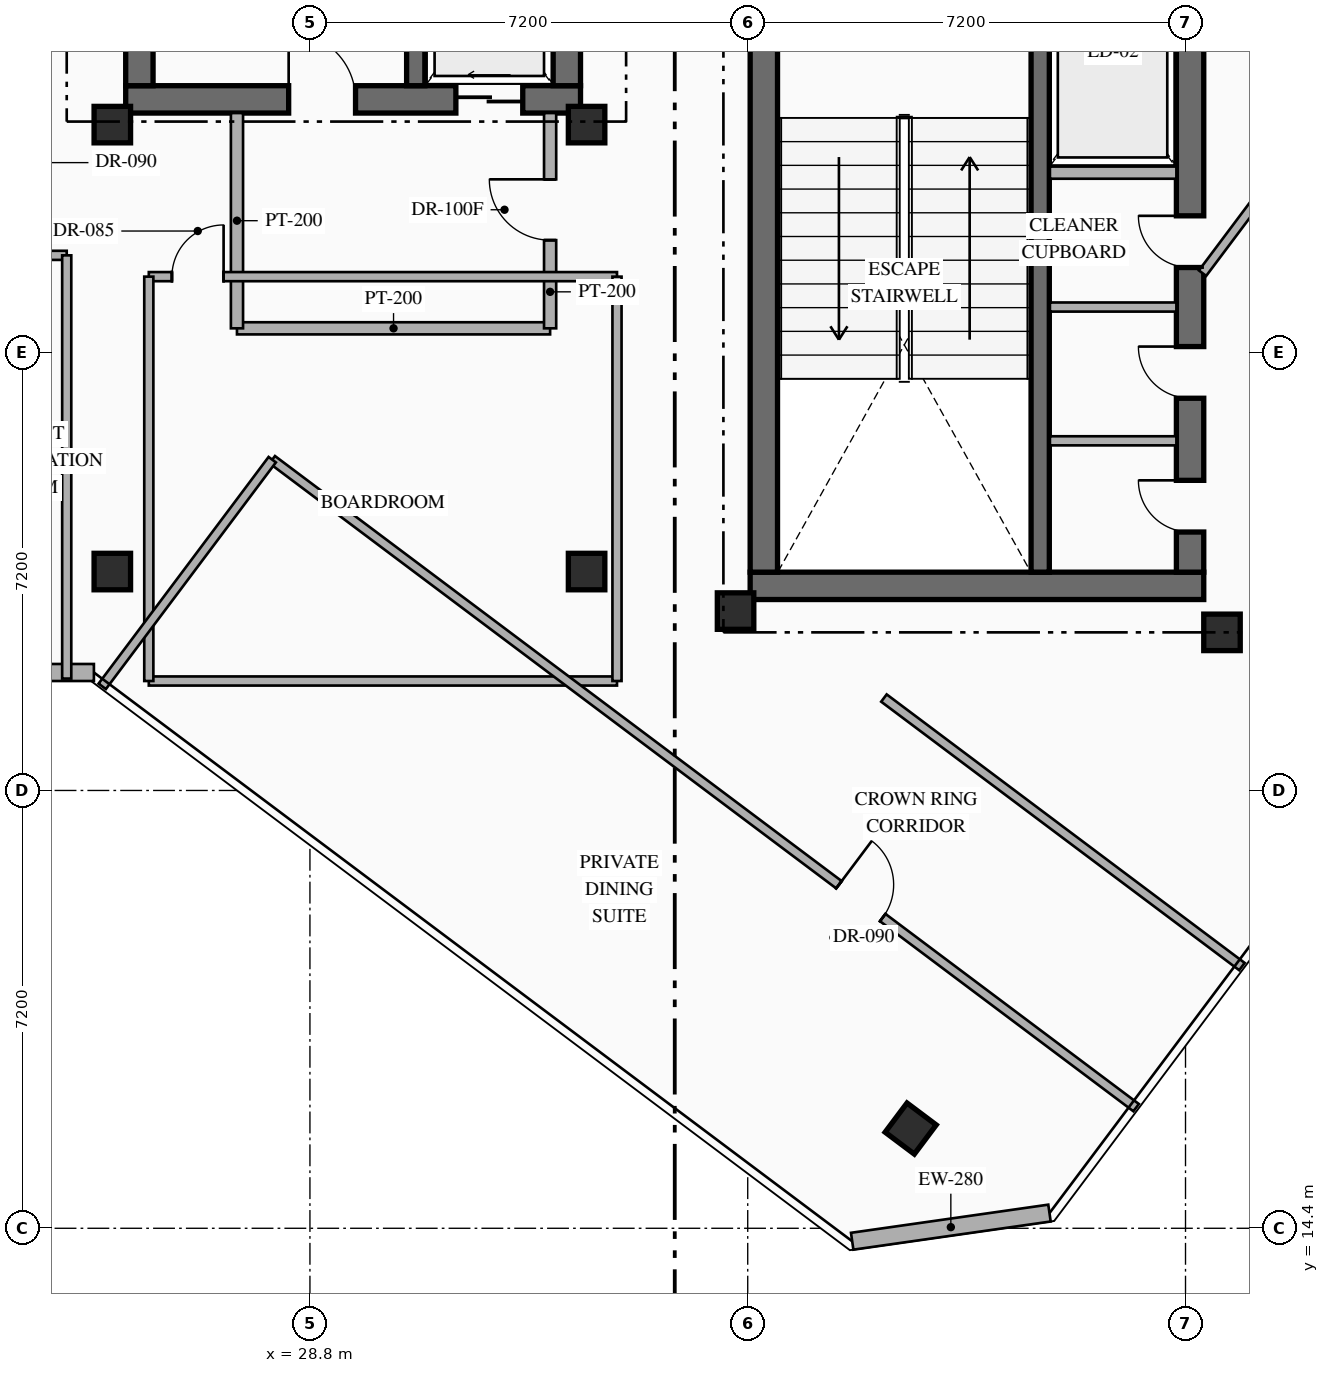
"""IFC4 building model, lengths in metres.
Left out: names, types, materials, properties, quantities, classifications, styles, units other than length and angle.
Written with IfcOpenShell. Run it as: python <this file> out.ifc"""

import sys

from ifc_helpers import new_model, si_unit, direction, frame, frame_2d, origin, origin_2d, place, context, subcontext, project, spatial, rectangle, hollow_rectangle, extrude, element, fill, save


model = new_model("IFC4")
c1 = context("Model", 3, precision=1e-05, world=origin(), true_north=direction((0.0, 1.0)))
c2 = subcontext(c1, "Body", "Model", "MODEL_VIEW")
j1 = project(units=[si_unit("LENGTHUNIT", "METRE"), si_unit("PLANEANGLEUNIT", "RADIAN")], contexts=[c1])
p1 = place(None, origin())
s1 = spatial("IfcSite", under=j1, at=p1, CompositionType="ELEMENT")
p2 = place(p1, origin())
s2 = spatial("IfcBuilding", under=s1, at=p2, CompositionType="ELEMENT")
p3 = place(p2, frame((0.0, 0.0, 273.95)))
s3 = spatial("IfcBuildingStorey", under=s2, at=p3, CompositionType="ELEMENT", Elevation=273.95)
p4 = place(p3, frame((25.77, 32.965, 0.0), z_axis=(0.0, 0.0, 1.0), x_axis=(1.0, 0.0, 0.0)))
e1 = element("IfcWall", 1, at=p4, inside=s3, PredefinedType="SHEAR", context=c2, shape_type="SweptSolid", body=[
    extrude(rectangle(XDim=7.48, YDim=0.45, at=frame_2d((3.74, 0.0))), origin(), (0.0, 0.0, 1.0), 4.0),
])
p5 = place(p4, frame((2.68, 0.0, 0.0)))
e2 = element("IfcOpeningElement", 2, at=p5, cuts=e1, PredefinedType="OPENING", context=c2, shape_type="SweptSolid", body=[
    extrude(rectangle(XDim=1.1, YDim=2.2, at=frame_2d((0.55, 1.1))), frame((0.0, 0.235, 0.0), z_axis=(0.0, -1.0, 0.0), x_axis=(1.0, 0.0, 0.0)), (0.0, 0.0, 1.0), 0.47),
])
p6 = place(p4, frame((5.43, 0.0, 0.0)))
e3 = element("IfcOpeningElement", 3, at=p6, cuts=e1, PredefinedType="OPENING", context=c2, shape_type="SweptSolid", body=[
    extrude(rectangle(XDim=1.1, YDim=2.15, at=frame_2d((0.55, 1.075))), frame((0.0, 0.235, 0.0), z_axis=(0.0, -1.0, 0.0), x_axis=(1.0, 0.0, 0.0)), (0.0, 0.0, 1.0), 0.47),
])
p7 = place(p3, frame((25.995, 33.19, 0.0), z_axis=(0.0, 0.0, 1.0), x_axis=(0.0, 1.0, 0.0)))
e4 = element("IfcWall", 4, at=p7, inside=s3, PredefinedType="SHEAR", context=c2, shape_type="SweptSolid", body=[
    extrude(rectangle(XDim=9.48, YDim=0.45, at=frame_2d((4.74, 0.0))), origin(), (0.0, 0.0, 1.0), 4.0),
])
p8 = place(p3, frame((33.025, 33.19, 0.0), z_axis=(0.0, 0.0, 1.0), x_axis=(0.0, 1.0, 0.0)))
e5 = element("IfcWall", 5, at=p8, inside=s3, PredefinedType="SHEAR", context=c2, shape_type="SweptSolid", body=[
    extrude(rectangle(XDim=9.48, YDim=0.45, at=frame_2d((4.74, 0.0))), origin(), (0.0, 0.0, 1.0), 4.0),
])
p9 = place(p8, frame((3.61, 0.0, 0.0)))
e6 = element("IfcOpeningElement", 6, at=p9, cuts=e5, PredefinedType="OPENING", context=c2, shape_type="SweptSolid", body=[
    extrude(rectangle(XDim=0.85, YDim=2.08, at=frame_2d((0.425, 1.04))), frame((0.0, 0.235, 0.0), z_axis=(0.0, -1.0, 0.0), x_axis=(1.0, 0.0, 0.0)), (0.0, 0.0, 1.0), 0.47),
])
p10 = place(p8, frame((5.76, 0.0, 0.0)))
e7 = element("IfcOpeningElement", 7, at=p10, cuts=e5, PredefinedType="OPENING", context=c2, shape_type="SweptSolid", body=[
    extrude(rectangle(XDim=0.85, YDim=2.08, at=frame_2d((0.425, 1.04))), frame((0.0, 0.235, 0.0), z_axis=(0.0, -1.0, 0.0), x_axis=(1.0, 0.0, 0.0)), (0.0, 0.0, 1.0), 0.47),
])
p11 = place(p8, frame((7.76, 0.0, 0.0)))
e8 = element("IfcOpeningElement", 8, at=p11, cuts=e5, PredefinedType="OPENING", context=c2, shape_type="SweptSolid", body=[
    extrude(rectangle(XDim=0.85, YDim=2.08, at=frame_2d((0.425, 1.04))), frame((0.0, 0.235, 0.0), z_axis=(0.0, -1.0, 0.0), x_axis=(1.0, 0.0, 0.0)), (0.0, 0.0, 1.0), 0.47),
])
p12 = place(p3, frame((30.54, 33.19, 0.0), z_axis=(0.0, 0.0, 1.0), x_axis=(0.0, 1.0, 0.0)))
e9 = element("IfcWall", 9, at=p12, inside=s3, PredefinedType="SHEAR", context=c2, shape_type="SweptSolid", body=[
    extrude(rectangle(XDim=9.48, YDim=0.3, at=frame_2d((4.74, 0.0))), origin(), (0.0, 0.0, 1.0), 4.0),
])
p13 = place(p3, frame((36.04, 24.965, 0.0), z_axis=(0.0, 0.0, 1.0), x_axis=(1.0, 0.0, 0.0)))
e10 = element("IfcWall", 10, at=p13, inside=s3, PredefinedType="SHEAR", context=c2, shape_type="SweptSolid", body=[
    extrude(rectangle(XDim=7.46, YDim=0.45, at=frame_2d((3.73, 0.0))), origin(), (0.0, 0.0, 1.0), 4.0),
])
p14 = place(p3, frame((36.265, 25.19, 0.0), z_axis=(0.0, 0.0, 1.0), x_axis=(0.0, 1.0, 0.0)))
e11 = element("IfcWall", 11, at=p14, inside=s3, PredefinedType="SHEAR", context=c2, shape_type="SweptSolid", body=[
    extrude(rectangle(XDim=9.48, YDim=0.45, at=frame_2d((4.74, 0.0))), origin(), (0.0, 0.0, 1.0), 4.0),
])
p15 = place(p3, frame((43.275, 25.19, 0.0), z_axis=(0.0, 0.0, 1.0), x_axis=(0.0, 1.0, 0.0)))
e12 = element("IfcWall", 12, at=p15, inside=s3, PredefinedType="SHEAR", context=c2, shape_type="SweptSolid", body=[
    extrude(rectangle(XDim=9.48, YDim=0.45, at=frame_2d((4.74, 0.0))), origin(), (0.0, 0.0, 1.0), 4.0),
])
p16 = place(p15, frame((0.66, 0.0, 0.0)))
e13 = element("IfcOpeningElement", 13, at=p16, cuts=e12, PredefinedType="OPENING", context=c2, shape_type="SweptSolid", body=[
    extrude(rectangle(XDim=0.85, YDim=2.08, at=frame_2d((0.425, 1.04))), frame((0.0, 0.235, 0.0), z_axis=(0.0, -1.0, 0.0), x_axis=(1.0, 0.0, 0.0)), (0.0, 0.0, 1.0), 0.47),
])
p17 = place(p15, frame((2.86, 0.0, 0.0)))
e14 = element("IfcOpeningElement", 14, at=p17, cuts=e12, PredefinedType="OPENING", context=c2, shape_type="SweptSolid", body=[
    extrude(rectangle(XDim=0.85, YDim=2.08, at=frame_2d((0.425, 1.04))), frame((0.0, 0.235, 0.0), z_axis=(0.0, -1.0, 0.0), x_axis=(1.0, 0.0, 0.0)), (0.0, 0.0, 1.0), 0.47),
])
p18 = place(p15, frame((5.01, 0.0, 0.0)))
e15 = element("IfcOpeningElement", 15, at=p18, cuts=e12, PredefinedType="OPENING", context=c2, shape_type="SweptSolid", body=[
    extrude(rectangle(XDim=0.85, YDim=2.08, at=frame_2d((0.425, 1.04))), frame((0.0, 0.235, 0.0), z_axis=(0.0, -1.0, 0.0), x_axis=(1.0, 0.0, 0.0)), (0.0, 0.0, 1.0), 0.47),
])
p19 = place(p3, frame((40.81, 25.19, 0.0), z_axis=(0.0, 0.0, 1.0), x_axis=(0.0, 1.0, 0.0)))
e16 = element("IfcWall", 16, at=p19, inside=s3, PredefinedType="SHEAR", context=c2, shape_type="SweptSolid", body=[
    extrude(rectangle(XDim=9.48, YDim=0.3, at=frame_2d((4.74, 0.0))), origin(), (0.0, 0.0, 1.0), 4.0),
])
for number, where, z_axis, x_axis in (
    (17, (25.55, 32.55, 0.0), (0.0, 0.0, 1.0), (1.0, 0.0, 0.0)),
    (18, (33.35, 32.55, 0.0), (0.0, 0.0, 1.0), (1.0, 0.0, 0.0)),
    (19, (35.8, 24.55, 0.0), (0.0, 0.0, 1.0), (1.0, 0.0, 0.0)),
    (20, (43.8, 24.2, 0.0), (0.0, 0.0, 1.0), (1.0, 0.0, 0.0)),
    (21, (25.55, 25.2, 0.0), (0.0, 0.0, 1.0), (1.0, 0.0, 0.0)),
    (22, (33.35, 25.2, 0.0), (0.0, 0.0, 1.0), (1.0, 0.0, 0.0)),
    (23, (38.68, 16.04, 0.0), (0.0, 0.0, 1.0), (0.8, -0.6, 0.0)),
):
    element("IfcColumn", number, at=place(p3, frame(where, z_axis=z_axis, x_axis=x_axis)), inside=s3, PredefinedType="COLUMN", context=c2, shape_type="SweptSolid", body=[
        extrude(hollow_rectangle(XDim=0.6, YDim=0.6, WallThickness=0.025, at=origin_2d()), origin(), (0.0, 0.0, 1.0), 4.0),
    ])
p20 = place(p3, frame((40.963, 14.65, 0.0), z_axis=(0.0, 0.0, 1.0), x_axis=(-0.989977778067, -0.141223223777, 0.0)))
e24 = element("IfcWall", 24, at=p20, inside=s3, PredefinedType="STANDARD", context=c2, shape_type="SweptSolid", body=[
    extrude(rectangle(XDim=3.278, YDim=0.28, at=frame_2d((1.639, 0.0))), origin(), (0.0, 0.0, 1.0), 3.75),
])
p21 = place(p3, frame((25.247, 23.54, 0.0), z_axis=(0.0, 0.0, 1.0), x_axis=(-1.0, 0.0, 0.0)))
e25 = element("IfcWall", 25, at=p21, inside=s3, PredefinedType="STANDARD", context=c2, shape_type="SweptSolid", body=[
    extrude(rectangle(XDim=4.707, YDim=0.28, at=frame_2d((2.354, 0.0))), origin(), (0.0, 0.0, 1.0), 3.75),
])
p22 = place(p3, frame((40.97, 31.76, 0.0), z_axis=(0.0, 0.0, 1.0), x_axis=(1.0, 0.0, 0.0)))
e26 = element("IfcWall", 26, at=p22, inside=s3, PredefinedType="STANDARD", context=c2, shape_type="SweptSolid", body=[
    extrude(rectangle(XDim=2.08, YDim=0.2, at=frame_2d((1.04, 0.0))), origin(), (0.0, 0.0, 1.0), 3.75),
])
for number, where, z_axis, x_axis in (
    (27, (40.97, 27.35, 0.0), (0.0, 0.0, 1.0), (1.0, 0.0, 0.0)),
    (28, (40.97, 29.55, 0.0), (0.0, 0.0, 1.0), (1.0, 0.0, 0.0)),
):
    element("IfcWall", number, at=place(p3, frame(where, z_axis=z_axis, x_axis=x_axis)), inside=s3, PredefinedType="PARTITIONING", context=c2, shape_type="SweptSolid", body=[
        extrude(rectangle(XDim=2.08, YDim=0.15, at=frame_2d((1.04, 0.0))), origin(), (0.0, 0.0, 1.0), 3.75),
    ])
p23 = place(p3, frame((27.6, 29.2, 0.0), z_axis=(0.0, 0.0, 1.0), x_axis=(1.0, 0.0, 0.0)))
e29 = element("IfcWall", 29, at=p23, inside=s3, PredefinedType="STANDARD", context=c2, shape_type="SweptSolid", body=[
    extrude(rectangle(XDim=5.15, YDim=0.2, at=frame_2d((2.575, 0.0))), origin(), (0.0, 0.0, 1.0), 3.75),
])
p24 = place(p3, frame((27.6, 29.2, 0.0), z_axis=(0.0, 0.0, 1.0), x_axis=(0.0, 1.0, 0.0)))
e30 = element("IfcWall", 30, at=p24, inside=s3, PredefinedType="STANDARD", context=c2, shape_type="SweptSolid", body=[
    extrude(rectangle(XDim=3.54, YDim=0.2, at=frame_2d((1.77, 0.0))), origin(), (0.0, 0.0, 1.0), 3.75),
])
p25 = place(p3, frame((32.75, 29.2, 0.0), z_axis=(0.0, 0.0, 1.0), x_axis=(0.0, 1.0, 0.0)))
e31 = element("IfcWall", 31, at=p25, inside=s3, PredefinedType="STANDARD", context=c2, shape_type="SweptSolid", body=[
    extrude(rectangle(XDim=3.54, YDim=0.2, at=frame_2d((1.77, 0.0))), origin(), (0.0, 0.0, 1.0), 3.75),
])
p26 = place(p25, frame((1.45, 0.0, 0.0)))
e32 = element("IfcOpeningElement", 32, at=p26, cuts=e31, PredefinedType="OPENING", context=c2, shape_type="SweptSolid", body=[
    extrude(rectangle(XDim=1.0, YDim=2.2, at=frame_2d((0.5, 1.1))), frame((0.0, 0.11, 0.0), z_axis=(0.0, -1.0, 0.0), x_axis=(1.0, 0.0, 0.0)), (0.0, 0.0, 1.0), 0.22),
])
p27 = place(p3, frame((26.15, 23.4, 0.0), z_axis=(0.0, 0.0, 1.0), x_axis=(1.0, 0.0, 0.0)))
e33 = element("IfcWall", 33, at=p27, inside=s3, PredefinedType="PARTITIONING", context=c2, shape_type="SweptSolid", body=[
    extrude(rectangle(XDim=7.7, YDim=0.15, at=frame_2d((3.85, 0.0))), origin(), (0.0, 0.0, 1.0), 3.75),
])
p28 = place(p3, frame((26.15, 30.05, 0.0), z_axis=(0.0, 0.0, 1.0), x_axis=(1.0, 0.0, 0.0)))
e34 = element("IfcWall", 34, at=p28, inside=s3, PredefinedType="PARTITIONING", context=c2, shape_type="SweptSolid", body=[
    extrude(rectangle(XDim=7.7, YDim=0.15, at=frame_2d((3.85, 0.0))), origin(), (0.0, 0.0, 1.0), 3.75),
])
p29 = place(p28, frame((0.38, 0.0, 0.0)))
e35 = element("IfcOpeningElement", 35, at=p29, cuts=e34, PredefinedType="OPENING", context=c2, shape_type="SweptSolid", body=[
    extrude(rectangle(XDim=0.85, YDim=2.08, at=frame_2d((0.425, 1.04))), frame((0.0, 0.085, 0.0), z_axis=(0.0, -1.0, 0.0), x_axis=(1.0, 0.0, 0.0)), (0.0, 0.0, 1.0), 0.17),
])
for number, where, z_axis, x_axis in (
    (36, (26.15, 23.4, 0.0), (0.0, 0.0, 1.0), (0.0, 1.0, 0.0)),
    (37, (33.85, 23.4, 0.0), (0.0, 0.0, 1.0), (0.0, 1.0, 0.0)),
):
    element("IfcWall", number, at=place(p3, frame(where, z_axis=z_axis, x_axis=x_axis)), inside=s3, PredefinedType="PARTITIONING", context=c2, shape_type="SweptSolid", body=[
        extrude(rectangle(XDim=6.65, YDim=0.15, at=frame_2d((3.325, 0.0))), origin(), (0.0, 0.0, 1.0), 3.75),
    ])
p30 = place(p3, frame((28.18, 27.04, 0.0), z_axis=(0.0, 0.0, 1.0), x_axis=(0.8, -0.6, 0.0)))
e38 = element("IfcWall", 38, at=p30, inside=s3, PredefinedType="PARTITIONING", context=c2, shape_type="SweptSolid", body=[
    extrude(rectangle(XDim=17.76, YDim=0.15, at=frame_2d((8.88, 0.0))), origin(), (0.0, 0.0, 1.0), 3.75),
])
p31 = place(p30, frame((11.65, 0.0, 0.0)))
e39 = element("IfcOpeningElement", 39, at=p31, cuts=e38, PredefinedType="OPENING", context=c2, shape_type="SweptSolid", body=[
    extrude(rectangle(XDim=0.9, YDim=2.15, at=frame_2d((0.45, 1.075))), frame((0.0, 0.085, 0.0), z_axis=(0.0, -1.0, 0.0), x_axis=(1.0, 0.0, 0.0)), (0.0, 0.0, 1.0), 0.17),
])
p32 = place(p3, frame((25.384, 23.312, 0.0), z_axis=(0.0, 0.0, 1.0), x_axis=(0.599983234706, 0.800012573696, 0.0)))
e40 = element("IfcWall", 40, at=p32, inside=s3, PredefinedType="PARTITIONING", context=c2, shape_type="SweptSolid", body=[
    extrude(rectangle(XDim=4.66, YDim=0.15, at=frame_2d((2.33, 0.0))), origin(), (0.0, 0.0, 1.0), 3.75),
])
p33 = place(p3, frame((22.85, 30.4, 0.0), z_axis=(0.0, 0.0, 1.0), x_axis=(1.0, 0.0, 0.0)))
e41 = element("IfcWall", 41, at=p33, inside=s3, PredefinedType="PARTITIONING", context=c2, shape_type="SweptSolid", body=[
    extrude(rectangle(XDim=1.95, YDim=0.15, at=frame_2d((0.975, 0.0))), origin(), (0.0, 0.0, 1.0), 3.75),
])
p34 = place(p33, frame((0.703, 0.0, 0.0)))
e42 = element("IfcOpeningElement", 42, at=p34, cuts=e41, PredefinedType="OPENING", context=c2, shape_type="SweptSolid", body=[
    extrude(rectangle(XDim=0.85, YDim=2.08, at=frame_2d((0.425, 1.04))), frame((0.0, 0.085, 0.0), z_axis=(0.0, -1.0, 0.0), x_axis=(1.0, 0.0, 0.0)), (0.0, 0.0, 1.0), 0.17),
])
p35 = place(p3, frame((24.8, 23.44, 0.0), z_axis=(0.0, 0.0, 1.0), x_axis=(0.0, 1.0, 0.0)))
e43 = element("IfcWall", 43, at=p35, inside=s3, PredefinedType="PARTITIONING", context=c2, shape_type="SweptSolid", body=[
    extrude(rectangle(XDim=6.96, YDim=0.15, at=frame_2d((3.48, 0.0))), origin(), (0.0, 0.0, 1.0), 3.75),
])
p36 = place(p3, frame((38.24, 23.12, 0.0), z_axis=(0.0, 0.0, 1.0), x_axis=(0.799996019408, -0.60000530742, 0.0)))
e44 = element("IfcWall", 44, at=p36, inside=s3, PredefinedType="PARTITIONING", context=c2, shape_type="SweptSolid", body=[
    extrude(rectangle(XDim=7.36, YDim=0.15, at=frame_2d((3.68, 0.0))), origin(), (0.0, 0.0, 1.0), 3.75),
])
p37 = place(p3, frame((43.48, 30.107, 0.0), z_axis=(0.0, 0.0, 1.0), x_axis=(0.600015730265, 0.799988202059, 0.0)))
e45 = element("IfcWall", 45, at=p37, inside=s3, PredefinedType="PARTITIONING", context=c2, shape_type="SweptSolid", body=[
    extrude(rectangle(XDim=4.967, YDim=0.15, at=frame_2d((2.483, 0.0))), origin(), (0.0, 0.0, 1.0), 3.75),
])
p38 = place(p37, frame((2.199, 0.0, 0.0)))
e46 = element("IfcOpeningElement", 46, at=p38, cuts=e45, PredefinedType="OPENING", context=c2, shape_type="SweptSolid", body=[
    extrude(rectangle(XDim=0.9, YDim=2.15, at=frame_2d((0.45, 1.075))), frame((0.0, 0.085, 0.0), z_axis=(0.0, -1.0, 0.0), x_axis=(1.0, 0.0, 0.0)), (0.0, 0.0, 1.0), 0.17),
])
p39 = place(p5, origin())
e47 = element("IfcDoor", 47, at=p39, inside=s3, OperationType="SINGLE_SWING_LEFT", PredefinedType="DOOR", context=c2, shape_type="SweptSolid", body=[
    extrude(rectangle(XDim=1.1, YDim=2.2, at=frame_2d((0.55, 1.1))), frame((0.0, 0.025, 0.0), z_axis=(0.0, -1.0, 0.0), x_axis=(1.0, 0.0, 0.0)), (0.0, 0.0, 1.0), 0.05),
])
fill(e2, e47)
p40 = place(p6, origin())
e48 = element("IfcDoor", 48, at=p40, inside=s3, OperationType="SLIDING_TO_LEFT", PredefinedType="USERDEFINED", context=c2, shape_type="SweptSolid", body=[
    extrude(rectangle(XDim=1.1, YDim=2.15, at=frame_2d((0.55, 1.075))), frame((0.0, 0.025, 0.0), z_axis=(0.0, -1.0, 0.0), x_axis=(1.0, 0.0, 0.0)), (0.0, 0.0, 1.0), 0.05),
])
fill(e3, e48)
p41 = place(p16, origin())
e49 = element("IfcDoor", 49, at=p41, inside=s3, OperationType="SINGLE_SWING_RIGHT", PredefinedType="DOOR", context=c2, shape_type="SweptSolid", body=[
    extrude(rectangle(XDim=0.85, YDim=2.08, at=frame_2d((0.425, 1.04))), frame((0.0, 0.025, 0.0), z_axis=(0.0, -1.0, 0.0), x_axis=(1.0, 0.0, 0.0)), (0.0, 0.0, 1.0), 0.05),
])
fill(e13, e49)
p42 = place(p17, origin())
e50 = element("IfcDoor", 50, at=p42, inside=s3, OperationType="SINGLE_SWING_RIGHT", PredefinedType="DOOR", context=c2, shape_type="SweptSolid", body=[
    extrude(rectangle(XDim=0.85, YDim=2.08, at=frame_2d((0.425, 1.04))), frame((0.0, 0.025, 0.0), z_axis=(0.0, -1.0, 0.0), x_axis=(1.0, 0.0, 0.0)), (0.0, 0.0, 1.0), 0.05),
])
fill(e14, e50)
p43 = place(p18, origin())
e51 = element("IfcDoor", 51, at=p43, inside=s3, OperationType="SINGLE_SWING_RIGHT", PredefinedType="DOOR", context=c2, shape_type="SweptSolid", body=[
    extrude(rectangle(XDim=0.85, YDim=2.08, at=frame_2d((0.425, 1.04))), frame((0.0, 0.025, 0.0), z_axis=(0.0, -1.0, 0.0), x_axis=(1.0, 0.0, 0.0)), (0.0, 0.0, 1.0), 0.05),
])
fill(e15, e51)
p44 = place(p26, origin())
e52 = element("IfcDoor", 52, at=p44, inside=s3, OperationType="SINGLE_SWING_RIGHT", PredefinedType="DOOR", context=c2, shape_type="SweptSolid", body=[
    extrude(rectangle(XDim=1.0, YDim=2.2, at=frame_2d((0.5, 1.1))), frame((0.0, 0.025, 0.0), z_axis=(0.0, -1.0, 0.0), x_axis=(1.0, 0.0, 0.0)), (0.0, 0.0, 1.0), 0.05),
])
fill(e32, e52)
p45 = place(p29, origin())
e53 = element("IfcDoor", 53, at=p45, inside=s3, OperationType="SINGLE_SWING_RIGHT", PredefinedType="DOOR", context=c2, shape_type="SweptSolid", body=[
    extrude(rectangle(XDim=0.85, YDim=2.08, at=frame_2d((0.425, 1.04))), frame((0.0, 0.025, 0.0), z_axis=(0.0, -1.0, 0.0), x_axis=(1.0, 0.0, 0.0)), (0.0, 0.0, 1.0), 0.05),
])
fill(e35, e53)
p46 = place(p31, origin())
e54 = element("IfcDoor", 54, at=p46, inside=s3, OperationType="SINGLE_SWING_LEFT", PredefinedType="DOOR", context=c2, shape_type="SweptSolid", body=[
    extrude(rectangle(XDim=0.9, YDim=2.15, at=frame_2d((0.45, 1.075))), frame((0.0, 0.025, 0.0), z_axis=(0.0, -1.0, 0.0), x_axis=(1.0, 0.0, 0.0)), (0.0, 0.0, 1.0), 0.05),
])
fill(e39, e54)
save(model, sys.argv[1])
